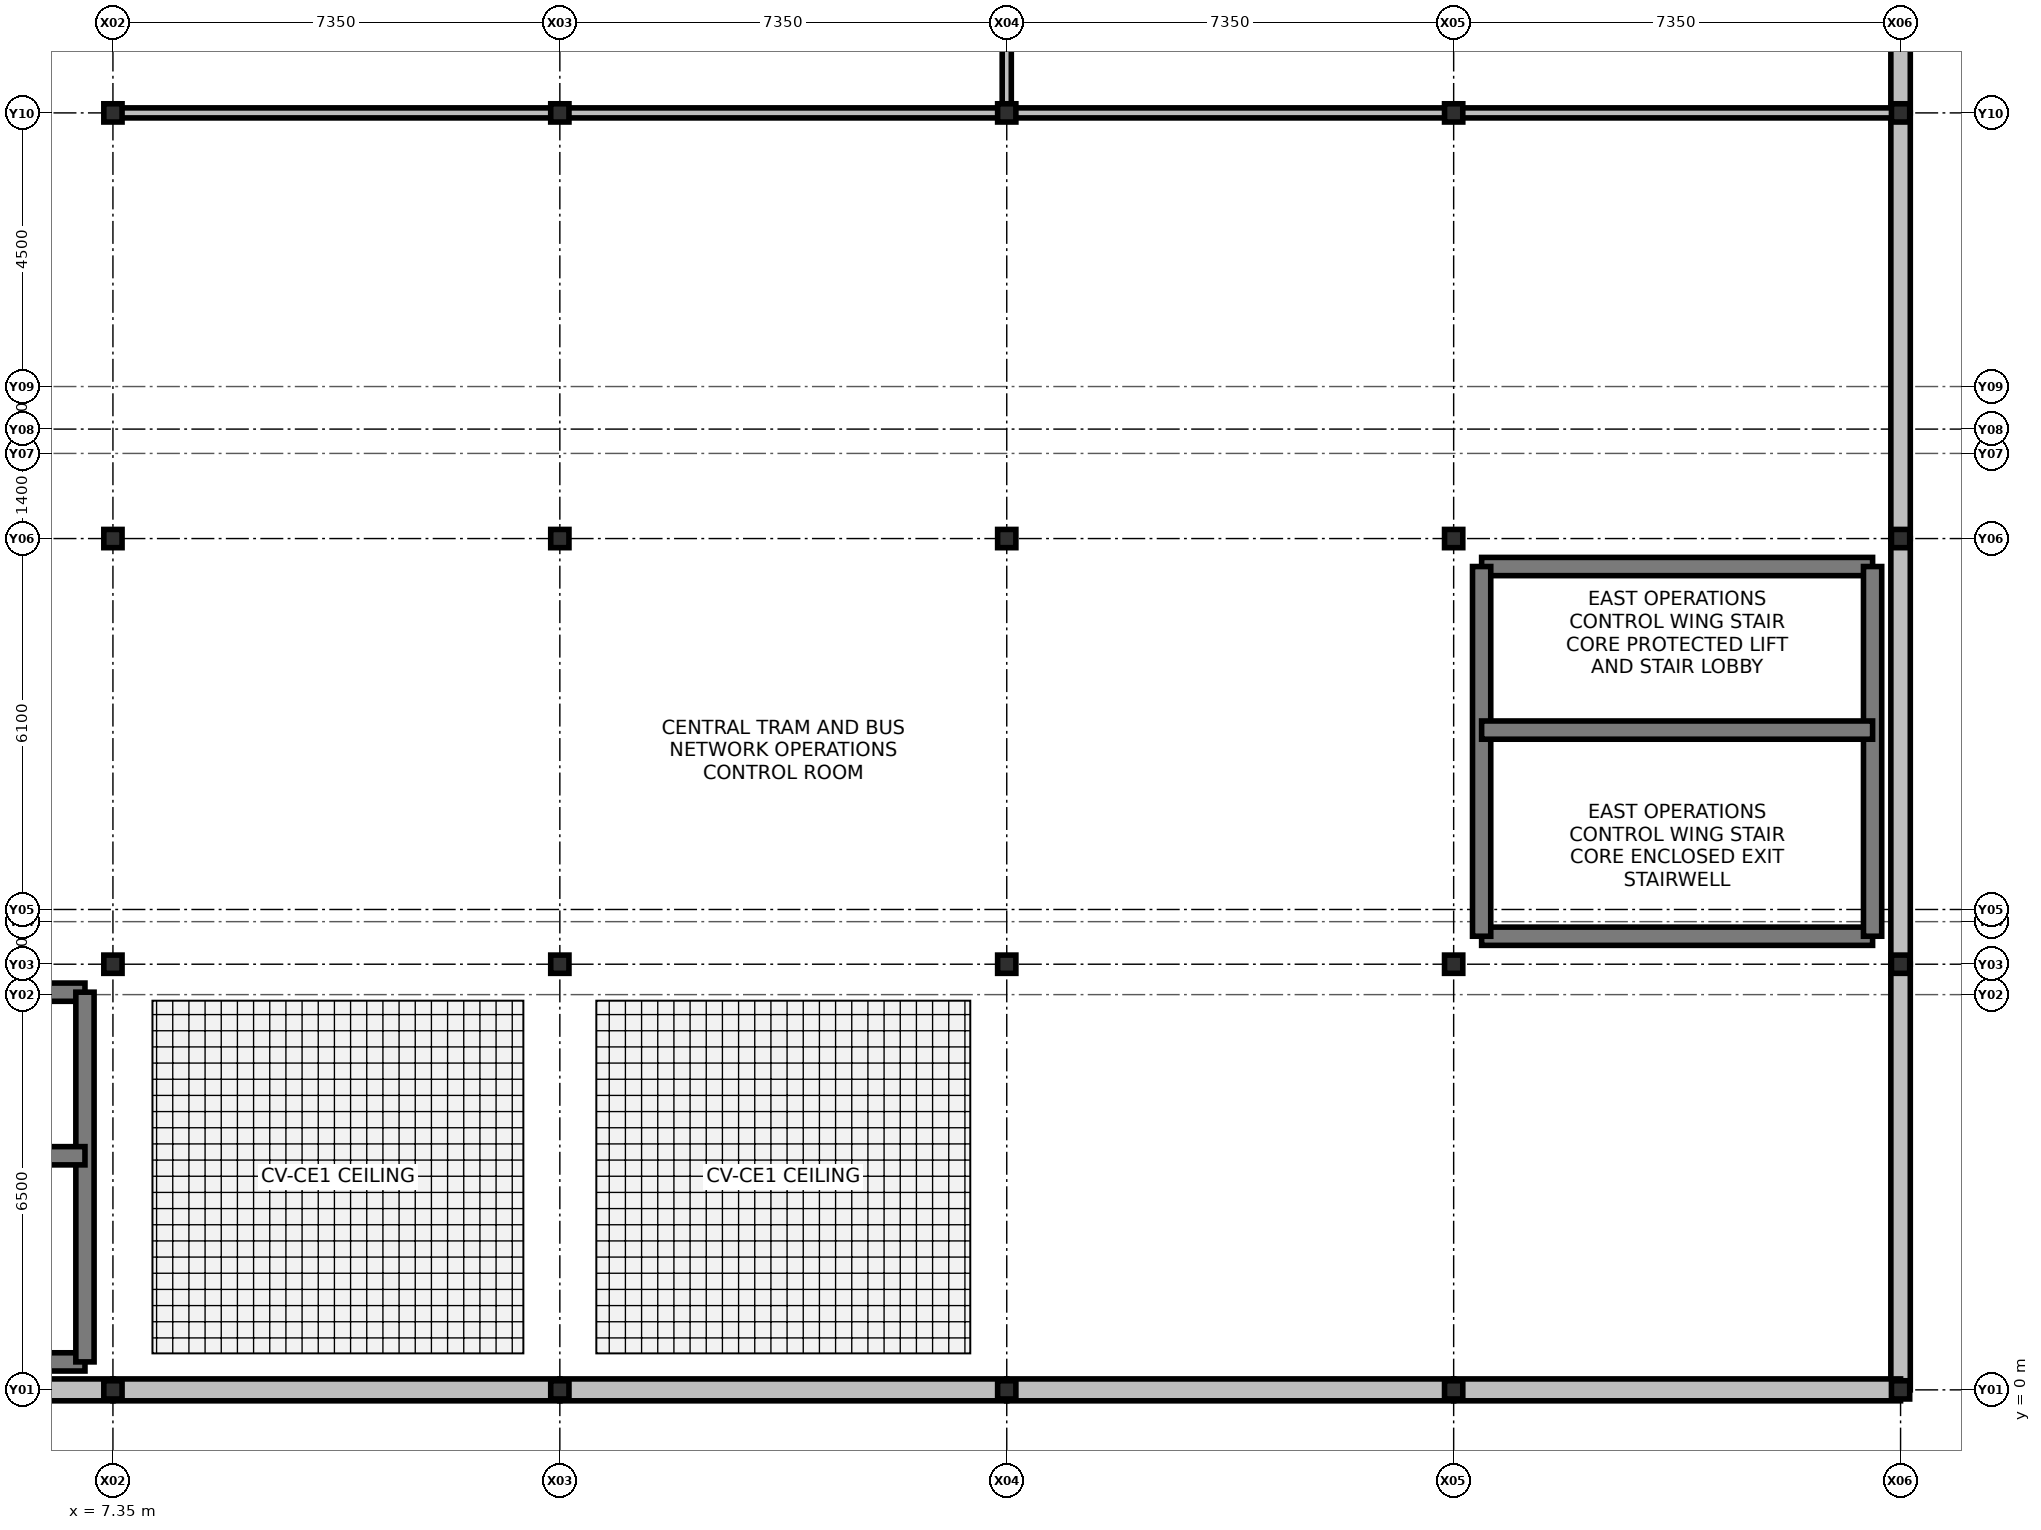
"""IFC4 building model, lengths in metres.
Left out: names, types, materials, properties, quantities, classifications, styles, units other than length and angle.
Written with IfcOpenShell. Run it as: python <this file> out.ifc"""

import sys

from ifc_helpers import new_model, si_unit, direction, frame, frame_2d, origin, origin_with_axes, origin_2d, place, context, subcontext, project, spatial, rectangle, i_section, extrude, element, fill, save


model = new_model("IFC4")
c1 = context("Model", 3, precision=1e-05, world=origin(), true_north=direction((0.0, 1.0)))
c2 = subcontext(c1, "Body", "Model", "MODEL_VIEW")
j1 = project(units=[si_unit("LENGTHUNIT", "METRE"), si_unit("PLANEANGLEUNIT", "RADIAN")], contexts=[c1])
p1 = place(None, origin())
s1 = spatial("IfcSite", under=j1, at=p1, CompositionType="ELEMENT")
p2 = place(p1, origin())
s2 = spatial("IfcBuilding", under=s1, at=p2, CompositionType="ELEMENT")
p3 = place(p2, frame((0.0, 0.0, 11.1)))
s3 = spatial("IfcBuildingStorey", under=s2, at=p3, CompositionType="ELEMENT", Elevation=11.1)
for number, where, z_axis, x_axis in (
    (1, (7.35, 0.0, 0.0), (0.0, 0.0, 1.0), (1.0, 0.0, 0.0)),
    (2, (7.35, 7.0, 0.0), (0.0, 0.0, 1.0), (1.0, 0.0, 0.0)),
    (3, (7.35, 14.0, 0.0), (0.0, 0.0, 1.0), (1.0, 0.0, 0.0)),
    (4, (7.35, 21.0, 0.0), (0.0, 0.0, 1.0), (1.0, 0.0, 0.0)),
    (5, (14.7, 0.0, 0.0), (0.0, 0.0, 1.0), (1.0, 0.0, 0.0)),
    (6, (14.7, 7.0, 0.0), (0.0, 0.0, 1.0), (1.0, 0.0, 0.0)),
    (7, (14.7, 14.0, 0.0), (0.0, 0.0, 1.0), (1.0, 0.0, 0.0)),
    (8, (14.7, 21.0, 0.0), (0.0, 0.0, 1.0), (1.0, 0.0, 0.0)),
    (9, (22.05, 0.0, 0.0), (0.0, 0.0, 1.0), (1.0, 0.0, 0.0)),
    (10, (22.05, 7.0, 0.0), (0.0, 0.0, 1.0), (1.0, 0.0, 0.0)),
    (11, (22.05, 14.0, 0.0), (0.0, 0.0, 1.0), (1.0, 0.0, 0.0)),
    (12, (22.05, 21.0, 0.0), (0.0, 0.0, 1.0), (1.0, 0.0, 0.0)),
    (13, (29.4, 0.0, 0.0), (0.0, 0.0, 1.0), (1.0, 0.0, 0.0)),
    (14, (29.4, 7.0, 0.0), (0.0, 0.0, 1.0), (1.0, 0.0, 0.0)),
    (15, (29.4, 14.0, 0.0), (0.0, 0.0, 1.0), (1.0, 0.0, 0.0)),
    (16, (29.4, 21.0, 0.0), (0.0, 0.0, 1.0), (1.0, 0.0, 0.0)),
    (17, (36.75, 0.0, 0.0), (0.0, 0.0, 1.0), (1.0, 0.0, 0.0)),
    (18, (36.75, 7.0, 0.0), (0.0, 0.0, 1.0), (1.0, 0.0, 0.0)),
    (19, (36.75, 14.0, 0.0), (0.0, 0.0, 1.0), (1.0, 0.0, 0.0)),
    (20, (36.75, 21.0, 0.0), (0.0, 0.0, 1.0), (1.0, 0.0, 0.0)),
):
    element("IfcColumn", number, at=place(p3, frame(where, z_axis=z_axis, x_axis=x_axis)), inside=s3, PredefinedType="COLUMN", context=c2, shape_type="SweptSolid", body=[
        extrude(i_section(OverallWidth=0.3, OverallDepth=0.3, WebThickness=0.01, FlangeThickness=0.015, at=origin_2d()), origin(), (0.0, 0.0, 1.0), 4.2),
    ])
for number, where, z_axis, x_axis in (
    (21, (36.75, 0.0, 0.0), (0.0, 0.0, 1.0), (0.0, 1.0, 0.0)),
    (22, (36.75, 7.0, 0.0), (0.0, 0.0, 1.0), (0.0, 1.0, 0.0)),
    (23, (36.75, 14.0, 0.0), (0.0, 0.0, 1.0), (0.0, 1.0, 0.0)),
):
    element("IfcWall", number, at=place(p3, frame(where, z_axis=z_axis, x_axis=x_axis)), inside=s3, PredefinedType="SOLIDWALL", context=c2, shape_type="SweptSolid", body=[
        extrude(rectangle(XDim=7.0, YDim=0.32, at=frame_2d((3.5, 0.0))), origin(), (0.0, 0.0, 1.0), 3.35),
    ])
p4 = place(p3, frame((36.75, 21.0, 0.0), z_axis=(0.0, 0.0, 1.0), x_axis=(0.0, 1.0, 0.0)))
e24 = element("IfcWall", 24, at=p4, inside=s3, PredefinedType="SOLIDWALL", context=c2, shape_type="SweptSolid", body=[
    extrude(rectangle(XDim=7.0, YDim=0.32, at=frame_2d((3.5, 0.0))), origin(), (0.0, 0.0, 1.0), 3.35),
])
p5 = place(p4, frame((2.95, 0.0, 0.0)))
e25 = element("IfcOpeningElement", 25, at=p5, cuts=e24, PredefinedType="OPENING", context=c2, shape_type="SweptSolid", body=[
    extrude(rectangle(XDim=1.1, YDim=2.2, at=frame_2d((0.55, 1.1))), frame((0.0, 0.17, 0.0), z_axis=(0.0, -1.0, 0.0), x_axis=(1.0, 0.0, 0.0)), (0.0, 0.0, 1.0), 0.34),
])
p6 = place(p3, origin_with_axes())
e26 = element("IfcWall", 26, at=p6, inside=s3, PredefinedType="SOLIDWALL", context=c2, shape_type="SweptSolid", body=[
    extrude(rectangle(XDim=7.35, YDim=0.36, at=frame_2d((3.675, 0.0))), origin(), (0.0, 0.0, 1.0), 3.35),
])
p7 = place(p6, frame((2.4, 0.0, 0.9)))
e27 = element("IfcOpeningElement", 27, at=p7, cuts=e26, PredefinedType="OPENING", context=c2, shape_type="SweptSolid", body=[
    extrude(rectangle(XDim=2.0, YDim=1.8, at=frame_2d((1.0, 0.9))), frame((0.0, 0.19, 0.0), z_axis=(0.0, -1.0, 0.0), x_axis=(1.0, 0.0, 0.0)), (0.0, 0.0, 1.0), 0.38),
])
p8 = place(p3, frame((7.35, 0.0, 0.0), z_axis=(0.0, 0.0, 1.0), x_axis=(1.0, 0.0, 0.0)))
e28 = element("IfcWall", 28, at=p8, inside=s3, PredefinedType="SOLIDWALL", context=c2, shape_type="SweptSolid", body=[
    extrude(rectangle(XDim=7.35, YDim=0.36, at=frame_2d((3.675, 0.0))), origin(), (0.0, 0.0, 1.0), 3.35),
])
p9 = place(p8, frame((2.4, 0.0, 0.9)))
e29 = element("IfcOpeningElement", 29, at=p9, cuts=e28, PredefinedType="OPENING", context=c2, shape_type="SweptSolid", body=[
    extrude(rectangle(XDim=2.1, YDim=2.1, at=frame_2d((1.05, 1.05))), frame((0.0, 0.19, 0.0), z_axis=(0.0, -1.0, 0.0), x_axis=(1.0, 0.0, 0.0)), (0.0, 0.0, 1.0), 0.38),
])
p10 = place(p3, frame((14.7, 0.0, 0.0), z_axis=(0.0, 0.0, 1.0), x_axis=(1.0, 0.0, 0.0)))
e30 = element("IfcWall", 30, at=p10, inside=s3, PredefinedType="SOLIDWALL", context=c2, shape_type="SweptSolid", body=[
    extrude(rectangle(XDim=7.35, YDim=0.36, at=frame_2d((3.675, 0.0))), origin(), (0.0, 0.0, 1.0), 3.35),
])
p11 = place(p10, frame((2.4, 0.0, 0.9)))
e31 = element("IfcOpeningElement", 31, at=p11, cuts=e30, PredefinedType="OPENING", context=c2, shape_type="SweptSolid", body=[
    extrude(rectangle(XDim=2.4, YDim=1.8, at=frame_2d((1.2, 0.9))), frame((0.0, 0.19, 0.0), z_axis=(0.0, -1.0, 0.0), x_axis=(1.0, 0.0, 0.0)), (0.0, 0.0, 1.0), 0.38),
])
p12 = place(p3, frame((22.05, 0.0, 0.0), z_axis=(0.0, 0.0, 1.0), x_axis=(1.0, 0.0, 0.0)))
e32 = element("IfcWall", 32, at=p12, inside=s3, PredefinedType="SOLIDWALL", context=c2, shape_type="SweptSolid", body=[
    extrude(rectangle(XDim=7.35, YDim=0.36, at=frame_2d((3.675, 0.0))), origin(), (0.0, 0.0, 1.0), 3.35),
])
p13 = place(p12, frame((2.4, 0.0, 0.9)))
e33 = element("IfcOpeningElement", 33, at=p13, cuts=e32, PredefinedType="OPENING", context=c2, shape_type="SweptSolid", body=[
    extrude(rectangle(XDim=2.4, YDim=2.1, at=frame_2d((1.2, 1.05))), frame((0.0, 0.19, 0.0), z_axis=(0.0, -1.0, 0.0), x_axis=(1.0, 0.0, 0.0)), (0.0, 0.0, 1.0), 0.38),
])
p14 = place(p3, frame((29.4, 0.0, 0.0), z_axis=(0.0, 0.0, 1.0), x_axis=(1.0, 0.0, 0.0)))
e34 = element("IfcWall", 34, at=p14, inside=s3, PredefinedType="SOLIDWALL", context=c2, shape_type="SweptSolid", body=[
    extrude(rectangle(XDim=7.35, YDim=0.36, at=frame_2d((3.675, 0.0))), origin(), (0.0, 0.0, 1.0), 3.35),
])
p15 = place(p14, frame((2.4, 0.0, 0.9)))
e35 = element("IfcOpeningElement", 35, at=p15, cuts=e34, PredefinedType="OPENING", context=c2, shape_type="SweptSolid", body=[
    extrude(rectangle(XDim=2.6, YDim=2.0, at=frame_2d((1.3, 1.0))), frame((0.0, 0.19, 0.0), z_axis=(0.0, -1.0, 0.0), x_axis=(1.0, 0.0, 0.0)), (0.0, 0.0, 1.0), 0.38),
])
p16 = place(p3, frame((29.86, 7.46, 0.0), z_axis=(0.0, 0.0, 1.0), x_axis=(1.0, 0.0, 0.0)))
e36 = element("IfcWall", 36, at=p16, inside=s3, PredefinedType="SHEAR", context=c2, shape_type="SweptSolid", body=[
    extrude(rectangle(XDim=6.43, YDim=0.3, at=frame_2d((3.215, 0.0))), origin(), (0.0, 0.0, 1.0), 3.92),
])
p17 = place(p3, frame((29.86, 13.54, 0.0), z_axis=(0.0, 0.0, 1.0), x_axis=(1.0, 0.0, 0.0)))
e37 = element("IfcWall", 37, at=p17, inside=s3, PredefinedType="SHEAR", context=c2, shape_type="SweptSolid", body=[
    extrude(rectangle(XDim=6.43, YDim=0.3, at=frame_2d((3.215, 0.0))), origin(), (0.0, 0.0, 1.0), 3.92),
])
p18 = place(p17, frame((0.55, 0.0, 0.0)))
e38 = element("IfcOpeningElement", 38, at=p18, cuts=e37, PredefinedType="OPENING", context=c2, shape_type="SweptSolid", body=[
    extrude(rectangle(XDim=1.5, YDim=2.2, at=frame_2d((0.75, 1.1))), frame((0.0, 0.16, 0.0), z_axis=(0.0, -1.0, 0.0), x_axis=(1.0, 0.0, 0.0)), (0.0, 0.0, 1.0), 0.32),
])
for number, where, z_axis, x_axis in (
    (39, (29.86, 7.46, 0.0), (0.0, 0.0, 1.0), (0.0, 1.0, 0.0)),
    (40, (36.29, 7.46, 0.0), (0.0, 0.0, 1.0), (0.0, 1.0, 0.0)),
):
    element("IfcWall", number, at=place(p3, frame(where, z_axis=z_axis, x_axis=x_axis)), inside=s3, PredefinedType="SHEAR", context=c2, shape_type="SweptSolid", body=[
        extrude(rectangle(XDim=6.08, YDim=0.3, at=frame_2d((3.04, 0.0))), origin(), (0.0, 0.0, 1.0), 3.92),
    ])
p19 = place(p3, frame((29.86, 10.85, 0.0), z_axis=(0.0, 0.0, 1.0), x_axis=(1.0, 0.0, 0.0)))
e41 = element("IfcWall", 41, at=p19, inside=s3, PredefinedType="SHEAR", context=c2, shape_type="SweptSolid", body=[
    extrude(rectangle(XDim=6.43, YDim=0.3, at=frame_2d((3.215, 0.0))), origin(), (0.0, 0.0, 1.0), 3.92),
])
p20 = place(p19, frame((0.185, 0.0, 0.0)))
e42 = element("IfcOpeningElement", 42, at=p20, cuts=e41, PredefinedType="OPENING", context=c2, shape_type="SweptSolid", body=[
    extrude(rectangle(XDim=1.05, YDim=2.15, at=frame_2d((0.525, 1.075))), frame((0.0, 0.16, 0.0), z_axis=(0.0, -1.0, 0.0), x_axis=(1.0, 0.0, 0.0)), (0.0, 0.0, 1.0), 0.32),
])
p21 = place(p3, frame((0.46, 0.46, 0.0), z_axis=(0.0, 0.0, 1.0), x_axis=(1.0, 0.0, 0.0)))
e43 = element("IfcWall", 43, at=p21, inside=s3, PredefinedType="SHEAR", context=c2, shape_type="SweptSolid", body=[
    extrude(rectangle(XDim=6.43, YDim=0.3, at=frame_2d((3.215, 0.0))), origin(), (0.0, 0.0, 1.0), 3.92),
])
p22 = place(p3, frame((0.46, 6.54, 0.0), z_axis=(0.0, 0.0, 1.0), x_axis=(1.0, 0.0, 0.0)))
e44 = element("IfcWall", 44, at=p22, inside=s3, PredefinedType="SHEAR", context=c2, shape_type="SweptSolid", body=[
    extrude(rectangle(XDim=6.43, YDim=0.3, at=frame_2d((3.215, 0.0))), origin(), (0.0, 0.0, 1.0), 3.92),
])
p23 = place(p22, frame((0.55, 0.0, 0.0)))
e45 = element("IfcOpeningElement", 45, at=p23, cuts=e44, PredefinedType="OPENING", context=c2, shape_type="SweptSolid", body=[
    extrude(rectangle(XDim=1.5, YDim=2.2, at=frame_2d((0.75, 1.1))), frame((0.0, 0.16, 0.0), z_axis=(0.0, -1.0, 0.0), x_axis=(1.0, 0.0, 0.0)), (0.0, 0.0, 1.0), 0.32),
])
p24 = place(p3, frame((6.89, 0.46, 0.0), z_axis=(0.0, 0.0, 1.0), x_axis=(0.0, 1.0, 0.0)))
e46 = element("IfcWall", 46, at=p24, inside=s3, PredefinedType="SHEAR", context=c2, shape_type="SweptSolid", body=[
    extrude(rectangle(XDim=6.08, YDim=0.3, at=frame_2d((3.04, 0.0))), origin(), (0.0, 0.0, 1.0), 3.92),
])
p25 = place(p3, frame((0.46, 3.85, 0.0), z_axis=(0.0, 0.0, 1.0), x_axis=(1.0, 0.0, 0.0)))
e47 = element("IfcWall", 47, at=p25, inside=s3, PredefinedType="SHEAR", context=c2, shape_type="SweptSolid", body=[
    extrude(rectangle(XDim=6.43, YDim=0.3, at=frame_2d((3.215, 0.0))), origin(), (0.0, 0.0, 1.0), 3.92),
])
p26 = place(p25, frame((0.185, 0.0, 0.0)))
e48 = element("IfcOpeningElement", 48, at=p26, cuts=e47, PredefinedType="OPENING", context=c2, shape_type="SweptSolid", body=[
    extrude(rectangle(XDim=1.05, YDim=2.15, at=frame_2d((0.525, 1.075))), frame((0.0, 0.16, 0.0), z_axis=(0.0, -1.0, 0.0), x_axis=(1.0, 0.0, 0.0)), (0.0, 0.0, 1.0), 0.32),
])
p27 = place(p3, frame((7.35, 21.0, 0.0), z_axis=(0.0, 0.0, 1.0), x_axis=(1.0, 0.0, 0.0)))
e49 = element("IfcWall", 49, at=p27, inside=s3, PredefinedType="PARTITIONING", context=c2, shape_type="SweptSolid", body=[
    extrude(rectangle(XDim=29.4, YDim=0.165, at=frame_2d((14.7, 0.0))), origin(), (0.0, 0.0, 1.0), 3.15),
])
p28 = place(p27, frame((4.0, 0.0, 0.0)))
e50 = element("IfcOpeningElement", 50, at=p28, cuts=e49, PredefinedType="OPENING", context=c2, shape_type="SweptSolid", body=[
    extrude(rectangle(XDim=1.35, YDim=2.2, at=frame_2d((0.675, 1.1))), frame((0.0, 0.092, 0.0), z_axis=(0.0, -1.0, 0.0), x_axis=(1.0, 0.0, 0.0)), (0.0, 0.0, 1.0), 0.185),
])
p29 = place(p27, frame((18.5, 0.0, 0.0)))
e51 = element("IfcOpeningElement", 51, at=p29, cuts=e49, PredefinedType="OPENING", context=c2, shape_type="SweptSolid", body=[
    extrude(rectangle(XDim=1.4, YDim=2.2, at=frame_2d((0.7, 1.1))), frame((0.0, 0.092, 0.0), z_axis=(0.0, -1.0, 0.0), x_axis=(1.0, 0.0, 0.0)), (0.0, 0.0, 1.0), 0.185),
])
p30 = place(p3, frame((22.05, 21.0, 0.0), z_axis=(0.0, 0.0, 1.0), x_axis=(0.0, 1.0, 0.0)))
e52 = element("IfcWall", 52, at=p30, inside=s3, PredefinedType="PARTITIONING", context=c2, shape_type="SweptSolid", body=[
    extrude(rectangle(XDim=14.0, YDim=0.15, at=frame_2d((7.0, 0.0))), origin(), (0.0, 0.0, 1.0), 3.15),
])
p31 = place(p30, frame((4.2, 0.0, 0.0)))
e53 = element("IfcOpeningElement", 53, at=p31, cuts=e52, PredefinedType="OPENING", context=c2, shape_type="SweptSolid", body=[
    extrude(rectangle(XDim=1.6, YDim=2.2, at=frame_2d((0.8, 1.1))), frame((0.0, 0.085, 0.0), z_axis=(0.0, -1.0, 0.0), x_axis=(1.0, 0.0, 0.0)), (0.0, 0.0, 1.0), 0.17),
])
p32 = place(p9, origin())
e54 = element("IfcWindow", 54, at=p32, inside=s3, PartitioningType="SINGLE_PANEL", PredefinedType="WINDOW", context=c2, shape_type="SweptSolid", body=[
    extrude(rectangle(XDim=2.1, YDim=2.1, at=frame_2d((1.05, 1.05))), frame((0.0, 0.03, 0.0), z_axis=(0.0, -1.0, 0.0), x_axis=(1.0, 0.0, 0.0)), (0.0, 0.0, 1.0), 0.06),
])
fill(e29, e54)
p33 = place(p11, origin())
e55 = element("IfcWindow", 55, at=p33, inside=s3, PartitioningType="SINGLE_PANEL", PredefinedType="WINDOW", context=c2, shape_type="SweptSolid", body=[
    extrude(rectangle(XDim=2.4, YDim=1.8, at=frame_2d((1.2, 0.9))), frame((0.0, 0.03, 0.0), z_axis=(0.0, -1.0, 0.0), x_axis=(1.0, 0.0, 0.0)), (0.0, 0.0, 1.0), 0.06),
])
fill(e31, e55)
p34 = place(p13, origin())
e56 = element("IfcWindow", 56, at=p34, inside=s3, PartitioningType="SINGLE_PANEL", PredefinedType="WINDOW", context=c2, shape_type="SweptSolid", body=[
    extrude(rectangle(XDim=2.4, YDim=2.1, at=frame_2d((1.2, 1.05))), frame((0.0, 0.03, 0.0), z_axis=(0.0, -1.0, 0.0), x_axis=(1.0, 0.0, 0.0)), (0.0, 0.0, 1.0), 0.06),
])
fill(e33, e56)
p35 = place(p15, origin())
e57 = element("IfcWindow", 57, at=p35, inside=s3, PartitioningType="SINGLE_PANEL", PredefinedType="WINDOW", context=c2, shape_type="SweptSolid", body=[
    extrude(rectangle(XDim=2.6, YDim=2.0, at=frame_2d((1.3, 1.0))), frame((0.0, 0.03, 0.0), z_axis=(0.0, -1.0, 0.0), x_axis=(1.0, 0.0, 0.0)), (0.0, 0.0, 1.0), 0.06),
])
fill(e35, e57)
p36 = place(p20, origin())
e58 = element("IfcDoor", 58, at=p36, inside=s3, OperationType="SINGLE_SWING_RIGHT", PredefinedType="DOOR", context=c2, shape_type="SweptSolid", body=[
    extrude(rectangle(XDim=1.05, YDim=2.15, at=frame_2d((0.525, 1.075))), frame((0.0, 0.025, 0.0), z_axis=(0.0, -1.0, 0.0), x_axis=(1.0, 0.0, 0.0)), (0.0, 0.0, 1.0), 0.05),
])
fill(e42, e58)
p37 = place(p18, origin())
e59 = element("IfcDoor", 59, at=p37, inside=s3, OperationType="DOUBLE_DOOR_SINGLE_SWING", PredefinedType="DOOR", context=c2, shape_type="SweptSolid", body=[
    extrude(rectangle(XDim=1.5, YDim=2.2, at=frame_2d((0.75, 1.1))), frame((0.0, 0.025, 0.0), z_axis=(0.0, -1.0, 0.0), x_axis=(1.0, 0.0, 0.0)), (0.0, 0.0, 1.0), 0.05),
])
fill(e38, e59)
p38 = place(p28, origin())
e60 = element("IfcDoor", 60, at=p38, inside=s3, OperationType="DOUBLE_DOOR_SINGLE_SWING", PredefinedType="DOOR", context=c2, shape_type="SweptSolid", body=[
    extrude(rectangle(XDim=1.35, YDim=2.2, at=frame_2d((0.675, 1.1))), frame((0.0, 0.025, 0.0), z_axis=(0.0, -1.0, 0.0), x_axis=(1.0, 0.0, 0.0)), (0.0, 0.0, 1.0), 0.05),
])
fill(e50, e60)
p39 = place(p29, origin())
e61 = element("IfcDoor", 61, at=p39, inside=s3, OperationType="DOUBLE_DOOR_SINGLE_SWING", PredefinedType="DOOR", context=c2, shape_type="SweptSolid", body=[
    extrude(rectangle(XDim=1.4, YDim=2.2, at=frame_2d((0.7, 1.1))), frame((0.0, 0.025, 0.0), z_axis=(0.0, -1.0, 0.0), x_axis=(1.0, 0.0, 0.0)), (0.0, 0.0, 1.0), 0.05),
])
fill(e51, e61)
save(model, sys.argv[1])
